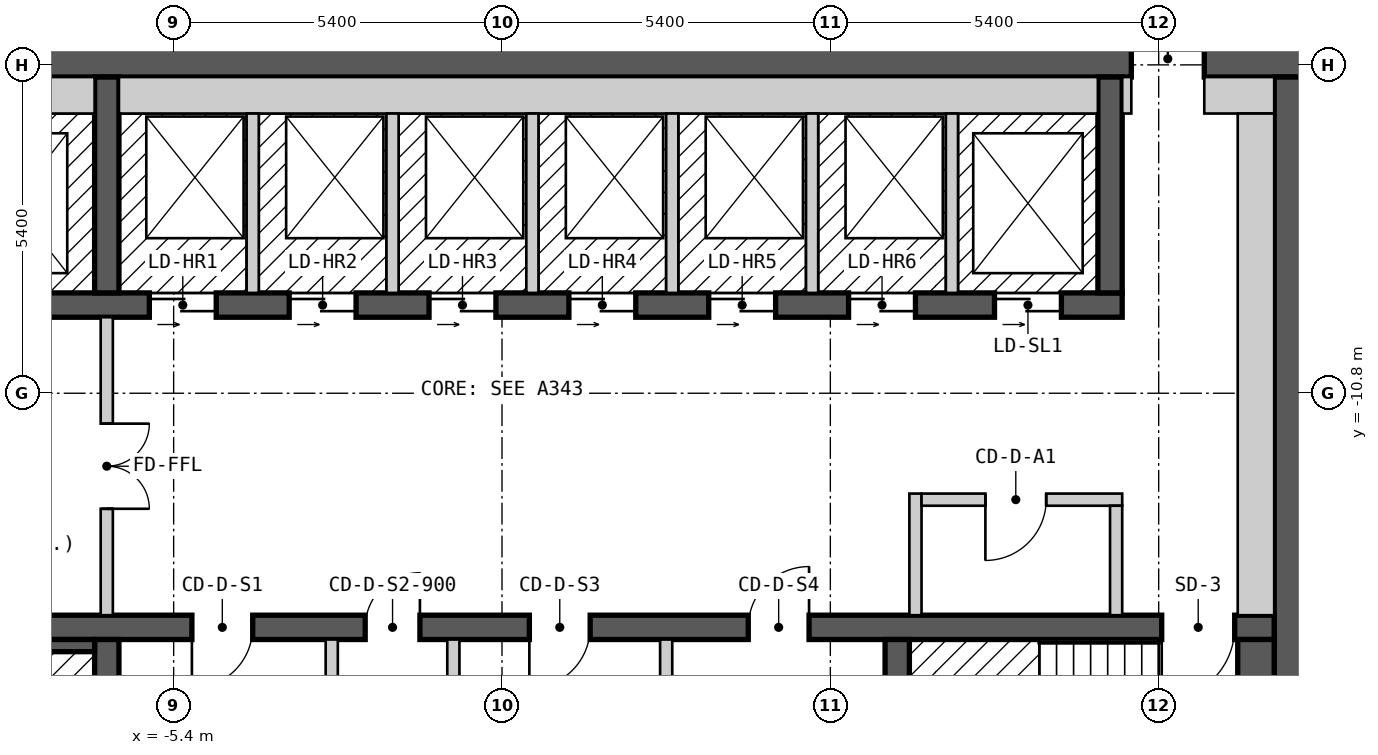
"""IFC4 building model, lengths in metres.
Left out: names, types, materials, properties, quantities, classifications, styles, units other than length and angle.
Written with IfcOpenShell. Run it as: python <this file> out.ifc"""

import sys

from ifc_helpers import new_model, si_unit, direction, frame, frame_2d, origin, place, context, subcontext, project, spatial, rectangle, extrude, element, fill, save


model = new_model("IFC4")
c1 = context("Model", 3, precision=1e-05, world=origin(), true_north=direction((0.0, 1.0)))
c2 = subcontext(c1, "Body", "Model", "MODEL_VIEW")
j1 = project(units=[si_unit("LENGTHUNIT", "METRE"), si_unit("PLANEANGLEUNIT", "RADIAN")], contexts=[c1])
p1 = place(None, origin())
s1 = spatial("IfcSite", under=j1, at=p1, CompositionType="ELEMENT")
p2 = place(p1, origin())
s2 = spatial("IfcBuilding", under=s1, at=p2, CompositionType="ELEMENT")
p3 = place(p2, frame((0.0, 0.0, 157.2)))
s3 = spatial("IfcBuildingStorey", under=s2, at=p3, CompositionType="ELEMENT", Elevation=157.2)
p4 = place(p3, frame((-13.3, -5.3, 0.0), z_axis=(0.0, 0.0, 1.0), x_axis=(1.0, 0.0, 0.0)))
e1 = element("IfcWall", 1, at=p4, inside=s3, PredefinedType="SHEAR", context=c2, shape_type="SweptSolid", body=[
    extrude(rectangle(XDim=26.6, YDim=0.6, at=frame_2d((13.3, 0.0))), origin(), (0.0, 0.0, 1.0), 5.7),
])
p5 = place(p4, frame((23.65, 0.0, 0.0)))
e2 = element("IfcOpeningElement", 2, at=p5, cuts=e1, PredefinedType="OPENING", context=c2, shape_type="SweptSolid", body=[
    extrude(rectangle(XDim=1.2, YDim=2.1, at=frame_2d((0.6, 1.05))), frame((0.0, 0.31, 0.0), z_axis=(0.0, -1.0, 0.0), x_axis=(1.0, 0.0, 0.0)), (0.0, 0.0, 1.0), 0.62),
])
p6 = place(p3, frame((13.0, -18.4, 0.0), z_axis=(0.0, 0.0, 1.0), x_axis=(0.0, 1.0, 0.0)))
e3 = element("IfcWall", 3, at=p6, inside=s3, PredefinedType="SHEAR", context=c2, shape_type="SweptSolid", body=[
    extrude(rectangle(XDim=12.8, YDim=0.6, at=frame_2d((6.4, 0.0))), origin(), (0.0, 0.0, 1.0), 5.7),
])
p7 = place(p3, frame((-12.7, -14.65, 0.0), z_axis=(0.0, 0.0, 1.0), x_axis=(1.0, 0.0, 0.0)))
e4 = element("IfcWall", 4, at=p7, inside=s3, PredefinedType="SHEAR", context=c2, shape_type="SweptSolid", body=[
    extrude(rectangle(XDim=25.4, YDim=0.4, at=frame_2d((12.7, 0.0))), origin(), (0.0, 0.0, 1.0), 5.7),
])
p8 = place(p7, frame((1.9, 0.0, 0.0), z_axis=(0.0, 0.0, 1.0), x_axis=(-1.0, 0.0, 0.0)))
e5 = element("IfcOpeningElement", 5, at=p8, cuts=e4, PredefinedType="OPENING", context=c2, shape_type="SweptSolid", body=[
    extrude(rectangle(XDim=1.2, YDim=2.1, at=frame_2d((0.6, 1.05))), frame((0.0, 0.21, 0.0), z_axis=(0.0, -1.0, 0.0), x_axis=(1.0, 0.0, 0.0)), (0.0, 0.0, 1.0), 0.42),
])
p9 = place(p7, frame((24.75, 0.0, 0.0), z_axis=(0.0, 0.0, 1.0), x_axis=(-1.0, 0.0, 0.0)))
e6 = element("IfcOpeningElement", 6, at=p9, cuts=e4, PredefinedType="OPENING", context=c2, shape_type="SweptSolid", body=[
    extrude(rectangle(XDim=1.2, YDim=2.1, at=frame_2d((0.6, 1.05))), frame((0.0, 0.21, 0.0), z_axis=(0.0, -1.0, 0.0), x_axis=(1.0, 0.0, 0.0)), (0.0, 0.0, 1.0), 0.42),
])
p10 = place(p7, frame((8.6, 0.0, 0.0), z_axis=(0.0, 0.0, 1.0), x_axis=(-1.0, 0.0, 0.0)))
e7 = element("IfcOpeningElement", 7, at=p10, cuts=e4, PredefinedType="OPENING", context=c2, shape_type="SweptSolid", body=[
    extrude(rectangle(XDim=1.0, YDim=2.1, at=frame_2d((0.5, 1.05))), frame((0.0, 0.21, 0.0), z_axis=(0.0, -1.0, 0.0), x_axis=(1.0, 0.0, 0.0)), (0.0, 0.0, 1.0), 0.42),
])
p11 = place(p7, frame((11.35, 0.0, 0.0), z_axis=(0.0, 0.0, 1.0), x_axis=(-1.0, 0.0, 0.0)))
e8 = element("IfcOpeningElement", 8, at=p11, cuts=e4, PredefinedType="OPENING", context=c2, shape_type="SweptSolid", body=[
    extrude(rectangle(XDim=0.9, YDim=2.1, at=frame_2d((0.45, 1.05))), frame((0.0, 0.21, 0.0), z_axis=(0.0, -1.0, 0.0), x_axis=(1.0, 0.0, 0.0)), (0.0, 0.0, 1.0), 0.42),
])
p12 = place(p7, frame((14.15, 0.0, 0.0), z_axis=(0.0, 0.0, 1.0), x_axis=(-1.0, 0.0, 0.0)))
e9 = element("IfcOpeningElement", 9, at=p12, cuts=e4, PredefinedType="OPENING", context=c2, shape_type="SweptSolid", body=[
    extrude(rectangle(XDim=1.0, YDim=2.1, at=frame_2d((0.5, 1.05))), frame((0.0, 0.21, 0.0), z_axis=(0.0, -1.0, 0.0), x_axis=(1.0, 0.0, 0.0)), (0.0, 0.0, 1.0), 0.42),
])
p13 = place(p7, frame((17.75, 0.0, 0.0), z_axis=(0.0, 0.0, 1.0), x_axis=(-1.0, 0.0, 0.0)))
e10 = element("IfcOpeningElement", 10, at=p13, cuts=e4, PredefinedType="OPENING", context=c2, shape_type="SweptSolid", body=[
    extrude(rectangle(XDim=1.0, YDim=2.1, at=frame_2d((0.5, 1.05))), frame((0.0, 0.21, 0.0), z_axis=(0.0, -1.0, 0.0), x_axis=(1.0, 0.0, 0.0)), (0.0, 0.0, 1.0), 0.42),
])
p14 = place(p3, frame((-12.7, -9.35, 0.0), z_axis=(0.0, 0.0, 1.0), x_axis=(1.0, 0.0, 0.0)))
e11 = element("IfcWall", 11, at=p14, inside=s3, PredefinedType="SHEAR", context=c2, shape_type="SweptSolid", body=[
    extrude(rectangle(XDim=22.9, YDim=0.4, at=frame_2d((11.45, 0.0))), origin(), (0.0, 0.0, 1.0), 5.7),
])
p15 = place(p14, frame((1.3, 0.0, 0.0)))
e12 = element("IfcOpeningElement", 12, at=p15, cuts=e11, PredefinedType="OPENING", context=c2, shape_type="SweptSolid", body=[
    extrude(rectangle(XDim=1.1, YDim=2.1, at=frame_2d((0.55, 1.05))), frame((0.0, 0.21, 0.0), z_axis=(0.0, -1.0, 0.0), x_axis=(1.0, 0.0, 0.0)), (0.0, 0.0, 1.0), 0.42),
])
p16 = place(p14, frame((4.1, 0.0, 0.0)))
e13 = element("IfcOpeningElement", 13, at=p16, cuts=e11, PredefinedType="OPENING", context=c2, shape_type="SweptSolid", body=[
    extrude(rectangle(XDim=1.1, YDim=2.1, at=frame_2d((0.55, 1.05))), frame((0.0, 0.21, 0.0), z_axis=(0.0, -1.0, 0.0), x_axis=(1.0, 0.0, 0.0)), (0.0, 0.0, 1.0), 0.42),
])
p17 = place(p14, frame((6.9, 0.0, 0.0)))
e14 = element("IfcOpeningElement", 14, at=p17, cuts=e11, PredefinedType="OPENING", context=c2, shape_type="SweptSolid", body=[
    extrude(rectangle(XDim=1.1, YDim=2.1, at=frame_2d((0.55, 1.05))), frame((0.0, 0.21, 0.0), z_axis=(0.0, -1.0, 0.0), x_axis=(1.0, 0.0, 0.0)), (0.0, 0.0, 1.0), 0.42),
])
p18 = place(p14, frame((9.2, 0.0, 0.0)))
e15 = element("IfcOpeningElement", 15, at=p18, cuts=e11, PredefinedType="OPENING", context=c2, shape_type="SweptSolid", body=[
    extrude(rectangle(XDim=1.1, YDim=2.1, at=frame_2d((0.55, 1.05))), frame((0.0, 0.21, 0.0), z_axis=(0.0, -1.0, 0.0), x_axis=(1.0, 0.0, 0.0)), (0.0, 0.0, 1.0), 0.42),
])
p19 = place(p14, frame((11.5, 0.0, 0.0)))
e16 = element("IfcOpeningElement", 16, at=p19, cuts=e11, PredefinedType="OPENING", context=c2, shape_type="SweptSolid", body=[
    extrude(rectangle(XDim=1.1, YDim=2.1, at=frame_2d((0.55, 1.05))), frame((0.0, 0.21, 0.0), z_axis=(0.0, -1.0, 0.0), x_axis=(1.0, 0.0, 0.0)), (0.0, 0.0, 1.0), 0.42),
])
p20 = place(p14, frame((13.8, 0.0, 0.0)))
e17 = element("IfcOpeningElement", 17, at=p20, cuts=e11, PredefinedType="OPENING", context=c2, shape_type="SweptSolid", body=[
    extrude(rectangle(XDim=1.1, YDim=2.1, at=frame_2d((0.55, 1.05))), frame((0.0, 0.21, 0.0), z_axis=(0.0, -1.0, 0.0), x_axis=(1.0, 0.0, 0.0)), (0.0, 0.0, 1.0), 0.42),
])
p21 = place(p14, frame((16.1, 0.0, 0.0)))
e18 = element("IfcOpeningElement", 18, at=p21, cuts=e11, PredefinedType="OPENING", context=c2, shape_type="SweptSolid", body=[
    extrude(rectangle(XDim=1.1, YDim=2.1, at=frame_2d((0.55, 1.05))), frame((0.0, 0.21, 0.0), z_axis=(0.0, -1.0, 0.0), x_axis=(1.0, 0.0, 0.0)), (0.0, 0.0, 1.0), 0.42),
])
p22 = place(p14, frame((18.4, 0.0, 0.0)))
e19 = element("IfcOpeningElement", 19, at=p22, cuts=e11, PredefinedType="OPENING", context=c2, shape_type="SweptSolid", body=[
    extrude(rectangle(XDim=1.1, YDim=2.1, at=frame_2d((0.55, 1.05))), frame((0.0, 0.21, 0.0), z_axis=(0.0, -1.0, 0.0), x_axis=(1.0, 0.0, 0.0)), (0.0, 0.0, 1.0), 0.42),
])
p23 = place(p14, frame((20.8, 0.0, 0.0)))
e20 = element("IfcOpeningElement", 20, at=p23, cuts=e11, PredefinedType="OPENING", context=c2, shape_type="SweptSolid", body=[
    extrude(rectangle(XDim=1.1, YDim=2.1, at=frame_2d((0.55, 1.05))), frame((0.0, 0.21, 0.0), z_axis=(0.0, -1.0, 0.0), x_axis=(1.0, 0.0, 0.0)), (0.0, 0.0, 1.0), 0.42),
])
for number, where, z_axis, x_axis in (
    (21, (-6.5, -18.4, 0.0), (0.0, 0.0, 1.0), (0.0, 1.0, 0.0)),
    (22, (6.5, -18.4, 0.0), (0.0, 0.0, 1.0), (0.0, 1.0, 0.0)),
    (23, (-6.5, -9.15, 0.0), (0.0, 0.0, 1.0), (0.0, 1.0, 0.0)),
    (24, (10.0, -9.15, 0.0), (0.0, 0.0, 1.0), (0.0, 1.0, 0.0)),
):
    element("IfcWall", number, at=place(p3, frame(where, z_axis=z_axis, x_axis=x_axis)), inside=s3, PredefinedType="SHEAR", context=c2, shape_type="SweptSolid", body=[
        extrude(rectangle(XDim=3.55, YDim=0.4, at=frame_2d((1.775, 0.0))), origin(), (0.0, 0.0, 1.0), 5.7),
    ])
p24 = place(p3, frame((-12.1, -5.9, 0.0), z_axis=(0.0, 0.0, 1.0), x_axis=(1.0, 0.0, 0.0)))
e25 = element("IfcWall", 25, at=p24, inside=s3, PredefinedType="SOLIDWALL", context=c2, shape_type="SweptSolid", body=[
    extrude(rectangle(XDim=5.4, YDim=0.6, at=frame_2d((2.7, 0.0))), origin(), (0.0, 0.0, 1.0), 5.7),
])
p25 = place(p3, frame((-10.8, -14.95, 0.0), z_axis=(0.0, 0.0, 1.0), x_axis=(1.0, 0.0, 0.0)))
e26 = element("IfcWall", 26, at=p25, inside=s3, PredefinedType="SOLIDWALL", context=c2, shape_type="SweptSolid", body=[
    extrude(rectangle(XDim=4.1, YDim=0.2, at=frame_2d((2.05, 0.0))), origin(), (0.0, 0.0, 1.0), 5.7),
])
p26 = place(p3, frame((-6.5, -14.45, 0.0), z_axis=(0.0, 0.0, 1.0), x_axis=(0.0, 1.0, 0.0)))
e27 = element("IfcWall", 27, at=p26, inside=s3, PredefinedType="PARTITIONING", context=c2, shape_type="SweptSolid", body=[
    extrude(rectangle(XDim=4.9, YDim=0.2, at=frame_2d((2.45, 0.0))), origin(), (0.0, 0.0, 1.0), 5.7),
])
p27 = place(p26, frame((3.15, 0.0, 0.0), z_axis=(0.0, 0.0, 1.0), x_axis=(-1.0, 0.0, 0.0)))
e28 = element("IfcOpeningElement", 28, at=p27, cuts=e27, PredefinedType="OPENING", context=c2, shape_type="SweptSolid", body=[
    extrude(rectangle(XDim=1.4, YDim=2.1, at=frame_2d((0.7, 1.05))), frame((0.0, 0.11, 0.0), z_axis=(0.0, -1.0, 0.0), x_axis=(1.0, 0.0, 0.0)), (0.0, 0.0, 1.0), 0.22),
])
p28 = place(p3, frame((-6.3, -5.9, 0.0), z_axis=(0.0, 0.0, 1.0), x_axis=(1.0, 0.0, 0.0)))
e29 = element("IfcWall", 29, at=p28, inside=s3, PredefinedType="SOLIDWALL", context=c2, shape_type="SweptSolid", body=[
    extrude(rectangle(XDim=16.1, YDim=0.6, at=frame_2d((8.05, 0.0))), origin(), (0.0, 0.0, 1.0), 5.7),
])
p29 = place(p3, frame((-4.1, -9.15, 0.0), z_axis=(0.0, 0.0, 1.0), x_axis=(0.0, 1.0, 0.0)))
e30 = element("IfcWall", 30, at=p29, inside=s3, PredefinedType="SOLIDWALL", context=c2, shape_type="SweptSolid", body=[
    extrude(rectangle(XDim=2.95, YDim=0.2, at=frame_2d((1.475, 0.0))), origin(), (0.0, 0.0, 1.0), 5.7),
])
p30 = place(p3, frame((-2.8, -17.8, 0.0), z_axis=(0.0, 0.0, 1.0), x_axis=(0.0, 1.0, 0.0)))
e31 = element("IfcWall", 31, at=p30, inside=s3, PredefinedType="PARTITIONING", context=c2, shape_type="SweptSolid", body=[
    extrude(rectangle(XDim=2.95, YDim=0.2, at=frame_2d((1.475, 0.0))), origin(), (0.0, 0.0, 1.0), 5.7),
])
p31 = place(p3, frame((-1.8, -9.15, 0.0), z_axis=(0.0, 0.0, 1.0), x_axis=(0.0, 1.0, 0.0)))
e32 = element("IfcWall", 32, at=p31, inside=s3, PredefinedType="SOLIDWALL", context=c2, shape_type="SweptSolid", body=[
    extrude(rectangle(XDim=2.95, YDim=0.2, at=frame_2d((1.475, 0.0))), origin(), (0.0, 0.0, 1.0), 5.7),
])
p32 = place(p3, frame((-0.8, -17.8, 0.0), z_axis=(0.0, 0.0, 1.0), x_axis=(0.0, 1.0, 0.0)))
e33 = element("IfcWall", 33, at=p32, inside=s3, PredefinedType="PARTITIONING", context=c2, shape_type="SweptSolid", body=[
    extrude(rectangle(XDim=2.95, YDim=0.2, at=frame_2d((1.475, 0.0))), origin(), (0.0, 0.0, 1.0), 5.7),
])
p33 = place(p3, frame((0.5, -9.15, 0.0), z_axis=(0.0, 0.0, 1.0), x_axis=(0.0, 1.0, 0.0)))
e34 = element("IfcWall", 34, at=p33, inside=s3, PredefinedType="SOLIDWALL", context=c2, shape_type="SweptSolid", body=[
    extrude(rectangle(XDim=2.95, YDim=0.2, at=frame_2d((1.475, 0.0))), origin(), (0.0, 0.0, 1.0), 5.7),
])
p34 = place(p3, frame((2.7, -17.8, 0.0), z_axis=(0.0, 0.0, 1.0), x_axis=(0.0, 1.0, 0.0)))
e35 = element("IfcWall", 35, at=p34, inside=s3, PredefinedType="PARTITIONING", context=c2, shape_type="SweptSolid", body=[
    extrude(rectangle(XDim=2.95, YDim=0.2, at=frame_2d((1.475, 0.0))), origin(), (0.0, 0.0, 1.0), 5.7),
])
for number, where, z_axis, x_axis in (
    (36, (2.8, -9.15, 0.0), (0.0, 0.0, 1.0), (0.0, 1.0, 0.0)),
    (37, (5.1, -9.15, 0.0), (0.0, 0.0, 1.0), (0.0, 1.0, 0.0)),
):
    element("IfcWall", number, at=place(p3, frame(where, z_axis=z_axis, x_axis=x_axis)), inside=s3, PredefinedType="SOLIDWALL", context=c2, shape_type="SweptSolid", body=[
        extrude(rectangle(XDim=2.95, YDim=0.2, at=frame_2d((1.475, 0.0))), origin(), (0.0, 0.0, 1.0), 5.7),
    ])
p35 = place(p3, frame((6.8, -14.45, 0.0), z_axis=(0.0, 0.0, 1.0), x_axis=(0.0, 1.0, 0.0)))
e38 = element("IfcWall", 38, at=p35, inside=s3, PredefinedType="PARTITIONING", context=c2, shape_type="SweptSolid", body=[
    extrude(rectangle(XDim=2.0, YDim=0.2, at=frame_2d((1.0, 0.0))), origin(), (0.0, 0.0, 1.0), 5.7),
])
p36 = place(p3, frame((6.9, -12.55, 0.0), z_axis=(0.0, 0.0, 1.0), x_axis=(1.0, 0.0, 0.0)))
e39 = element("IfcWall", 39, at=p36, inside=s3, PredefinedType="PARTITIONING", context=c2, shape_type="SweptSolid", body=[
    extrude(rectangle(XDim=3.3, YDim=0.2, at=frame_2d((1.65, 0.0))), origin(), (0.0, 0.0, 1.0), 5.7),
])
p37 = place(p36, frame((2.05, 0.0, 0.0), z_axis=(0.0, 0.0, 1.0), x_axis=(-1.0, 0.0, 0.0)))
e40 = element("IfcOpeningElement", 40, at=p37, cuts=e39, PredefinedType="OPENING", context=c2, shape_type="SweptSolid", body=[
    extrude(rectangle(XDim=1.0, YDim=2.1, at=frame_2d((0.5, 1.05))), frame((0.0, 0.11, 0.0), z_axis=(0.0, -1.0, 0.0), x_axis=(1.0, 0.0, 0.0)), (0.0, 0.0, 1.0), 0.22),
])
p38 = place(p3, frame((7.4, -9.15, 0.0), z_axis=(0.0, 0.0, 1.0), x_axis=(0.0, 1.0, 0.0)))
e41 = element("IfcWall", 41, at=p38, inside=s3, PredefinedType="SOLIDWALL", context=c2, shape_type="SweptSolid", body=[
    extrude(rectangle(XDim=2.95, YDim=0.2, at=frame_2d((1.475, 0.0))), origin(), (0.0, 0.0, 1.0), 5.7),
])
p39 = place(p3, frame((10.1, -14.45, 0.0), z_axis=(0.0, 0.0, 1.0), x_axis=(0.0, 1.0, 0.0)))
e42 = element("IfcWall", 42, at=p39, inside=s3, PredefinedType="PARTITIONING", context=c2, shape_type="SweptSolid", body=[
    extrude(rectangle(XDim=1.8, YDim=0.2, at=frame_2d((0.9, 0.0))), origin(), (0.0, 0.0, 1.0), 5.7),
])
p40 = place(p3, frame((10.275, -6.2, 0.0), z_axis=(0.0, 0.0, 1.0), x_axis=(0.0, 1.0, 0.0)))
e43 = element("IfcWall", 43, at=p40, inside=s3, PredefinedType="PARTITIONING", context=c2, shape_type="SweptSolid", body=[
    extrude(rectangle(XDim=0.6, YDim=0.15, at=frame_2d((0.3, 0.0))), origin(), (0.0, 0.0, 1.0), 5.7),
])
p41 = place(p3, frame((11.55, -5.9, 0.0), z_axis=(0.0, 0.0, 1.0), x_axis=(1.0, 0.0, 0.0)))
e44 = element("IfcWall", 44, at=p41, inside=s3, PredefinedType="PARTITIONING", context=c2, shape_type="SweptSolid", body=[
    extrude(rectangle(XDim=1.15, YDim=0.6, at=frame_2d((0.575, 0.0))), origin(), (0.0, 0.0, 1.0), 5.7),
])
p42 = place(p3, frame((12.4, -17.6, 0.0), z_axis=(0.0, 0.0, 1.0), x_axis=(0.0, 1.0, 0.0)))
e45 = element("IfcWall", 45, at=p42, inside=s3, PredefinedType="SOLIDWALL", context=c2, shape_type="SweptSolid", body=[
    extrude(rectangle(XDim=2.75, YDim=0.6, at=frame_2d((1.375, 0.0))), origin(), (0.0, 0.0, 1.0), 5.7),
])
p43 = place(p3, frame((12.4, -14.45, 0.0), z_axis=(0.0, 0.0, 1.0), x_axis=(0.0, 1.0, 0.0)))
e46 = element("IfcWall", 46, at=p43, inside=s3, PredefinedType="PARTITIONING", context=c2, shape_type="SweptSolid", body=[
    extrude(rectangle(XDim=8.25, YDim=0.6, at=frame_2d((4.125, 0.0))), origin(), (0.0, 0.0, 1.0), 5.7),
])
p44 = place(p17, origin())
e47 = element("IfcDoor", 47, at=p44, inside=s3, OperationType="DOUBLE_DOOR_SLIDING", PredefinedType="DOOR", context=c2, shape_type="SweptSolid", body=[
    extrude(rectangle(XDim=1.1, YDim=2.1, at=frame_2d((0.55, 1.05))), frame((0.0, 0.025, 0.0), z_axis=(0.0, -1.0, 0.0), x_axis=(1.0, 0.0, 0.0)), (0.0, 0.0, 1.0), 0.05),
])
fill(e14, e47)
p45 = place(p18, origin())
e48 = element("IfcDoor", 48, at=p45, inside=s3, OperationType="DOUBLE_DOOR_SLIDING", PredefinedType="DOOR", context=c2, shape_type="SweptSolid", body=[
    extrude(rectangle(XDim=1.1, YDim=2.1, at=frame_2d((0.55, 1.05))), frame((0.0, 0.025, 0.0), z_axis=(0.0, -1.0, 0.0), x_axis=(1.0, 0.0, 0.0)), (0.0, 0.0, 1.0), 0.05),
])
fill(e15, e48)
p46 = place(p19, origin())
e49 = element("IfcDoor", 49, at=p46, inside=s3, OperationType="DOUBLE_DOOR_SLIDING", PredefinedType="DOOR", context=c2, shape_type="SweptSolid", body=[
    extrude(rectangle(XDim=1.1, YDim=2.1, at=frame_2d((0.55, 1.05))), frame((0.0, 0.025, 0.0), z_axis=(0.0, -1.0, 0.0), x_axis=(1.0, 0.0, 0.0)), (0.0, 0.0, 1.0), 0.05),
])
fill(e16, e49)
p47 = place(p20, origin())
e50 = element("IfcDoor", 50, at=p47, inside=s3, OperationType="DOUBLE_DOOR_SLIDING", PredefinedType="DOOR", context=c2, shape_type="SweptSolid", body=[
    extrude(rectangle(XDim=1.1, YDim=2.1, at=frame_2d((0.55, 1.05))), frame((0.0, 0.025, 0.0), z_axis=(0.0, -1.0, 0.0), x_axis=(1.0, 0.0, 0.0)), (0.0, 0.0, 1.0), 0.05),
])
fill(e17, e50)
p48 = place(p21, origin())
e51 = element("IfcDoor", 51, at=p48, inside=s3, OperationType="DOUBLE_DOOR_SLIDING", PredefinedType="DOOR", context=c2, shape_type="SweptSolid", body=[
    extrude(rectangle(XDim=1.1, YDim=2.1, at=frame_2d((0.55, 1.05))), frame((0.0, 0.025, 0.0), z_axis=(0.0, -1.0, 0.0), x_axis=(1.0, 0.0, 0.0)), (0.0, 0.0, 1.0), 0.05),
])
fill(e18, e51)
p49 = place(p22, origin())
e52 = element("IfcDoor", 52, at=p49, inside=s3, OperationType="DOUBLE_DOOR_SLIDING", PredefinedType="DOOR", context=c2, shape_type="SweptSolid", body=[
    extrude(rectangle(XDim=1.1, YDim=2.1, at=frame_2d((0.55, 1.05))), frame((0.0, 0.025, 0.0), z_axis=(0.0, -1.0, 0.0), x_axis=(1.0, 0.0, 0.0)), (0.0, 0.0, 1.0), 0.05),
])
fill(e19, e52)
p50 = place(p23, origin())
e53 = element("IfcDoor", 53, at=p50, inside=s3, OperationType="DOUBLE_DOOR_SLIDING", PredefinedType="DOOR", context=c2, shape_type="SweptSolid", body=[
    extrude(rectangle(XDim=1.1, YDim=2.1, at=frame_2d((0.55, 1.05))), frame((0.0, 0.025, 0.0), z_axis=(0.0, -1.0, 0.0), x_axis=(1.0, 0.0, 0.0)), (0.0, 0.0, 1.0), 0.05),
])
fill(e20, e53)
p51 = place(p9, origin())
e54 = element("IfcDoor", 54, at=p51, inside=s3, OperationType="SINGLE_SWING_RIGHT", PredefinedType="DOOR", context=c2, shape_type="SweptSolid", body=[
    extrude(rectangle(XDim=1.2, YDim=2.1, at=frame_2d((0.6, 1.05))), frame((0.0, 0.025, 0.0), z_axis=(0.0, -1.0, 0.0), x_axis=(1.0, 0.0, 0.0)), (0.0, 0.0, 1.0), 0.05),
])
fill(e6, e54)
p52 = place(p27, origin())
e55 = element("IfcDoor", 55, at=p52, inside=s3, OperationType="DOUBLE_DOOR_SINGLE_SWING", PredefinedType="DOOR", context=c2, shape_type="SweptSolid", body=[
    extrude(rectangle(XDim=1.4, YDim=2.1, at=frame_2d((0.7, 1.05))), frame((0.0, 0.025, 0.0), z_axis=(0.0, -1.0, 0.0), x_axis=(1.0, 0.0, 0.0)), (0.0, 0.0, 1.0), 0.05),
])
fill(e28, e55)
p53 = place(p5, origin())
e56 = element("IfcDoor", 56, at=p53, inside=s3, OperationType="DOUBLE_DOOR_SINGLE_SWING", PredefinedType="DOOR", context=c2, shape_type="SweptSolid", body=[
    extrude(rectangle(XDim=1.2, YDim=2.1, at=frame_2d((0.6, 1.05))), frame((0.0, 0.025, 0.0), z_axis=(0.0, -1.0, 0.0), x_axis=(1.0, 0.0, 0.0)), (0.0, 0.0, 1.0), 0.05),
])
fill(e2, e56)
p54 = place(p37, origin())
e57 = element("IfcDoor", 57, at=p54, inside=s3, OperationType="SINGLE_SWING_RIGHT", PredefinedType="DOOR", context=c2, shape_type="SweptSolid", body=[
    extrude(rectangle(XDim=1.0, YDim=2.1, at=frame_2d((0.5, 1.05))), frame((0.0, 0.025, 0.0), z_axis=(0.0, -1.0, 0.0), x_axis=(1.0, 0.0, 0.0)), (0.0, 0.0, 1.0), 0.05),
])
fill(e40, e57)
p55 = place(p10, origin())
e58 = element("IfcDoor", 58, at=p55, inside=s3, OperationType="SINGLE_SWING_RIGHT", PredefinedType="DOOR", context=c2, shape_type="SweptSolid", body=[
    extrude(rectangle(XDim=1.0, YDim=2.1, at=frame_2d((0.5, 1.05))), frame((0.0, 0.025, 0.0), z_axis=(0.0, -1.0, 0.0), x_axis=(1.0, 0.0, 0.0)), (0.0, 0.0, 1.0), 0.05),
])
fill(e7, e58)
p56 = place(p11, origin())
e59 = element("IfcDoor", 59, at=p56, inside=s3, OperationType="SINGLE_SWING_LEFT", PredefinedType="DOOR", context=c2, shape_type="SweptSolid", body=[
    extrude(rectangle(XDim=0.9, YDim=2.1, at=frame_2d((0.45, 1.05))), frame((0.0, 0.025, 0.0), z_axis=(0.0, -1.0, 0.0), x_axis=(1.0, 0.0, 0.0)), (0.0, 0.0, 1.0), 0.05),
])
fill(e8, e59)
p57 = place(p12, origin())
e60 = element("IfcDoor", 60, at=p57, inside=s3, OperationType="SINGLE_SWING_RIGHT", PredefinedType="DOOR", context=c2, shape_type="SweptSolid", body=[
    extrude(rectangle(XDim=1.0, YDim=2.1, at=frame_2d((0.5, 1.05))), frame((0.0, 0.025, 0.0), z_axis=(0.0, -1.0, 0.0), x_axis=(1.0, 0.0, 0.0)), (0.0, 0.0, 1.0), 0.05),
])
fill(e9, e60)
p58 = place(p13, origin())
e61 = element("IfcDoor", 61, at=p58, inside=s3, OperationType="SINGLE_SWING_LEFT", PredefinedType="DOOR", context=c2, shape_type="SweptSolid", body=[
    extrude(rectangle(XDim=1.0, YDim=2.1, at=frame_2d((0.5, 1.05))), frame((0.0, 0.025, 0.0), z_axis=(0.0, -1.0, 0.0), x_axis=(1.0, 0.0, 0.0)), (0.0, 0.0, 1.0), 0.05),
])
fill(e10, e61)
save(model, sys.argv[1])
